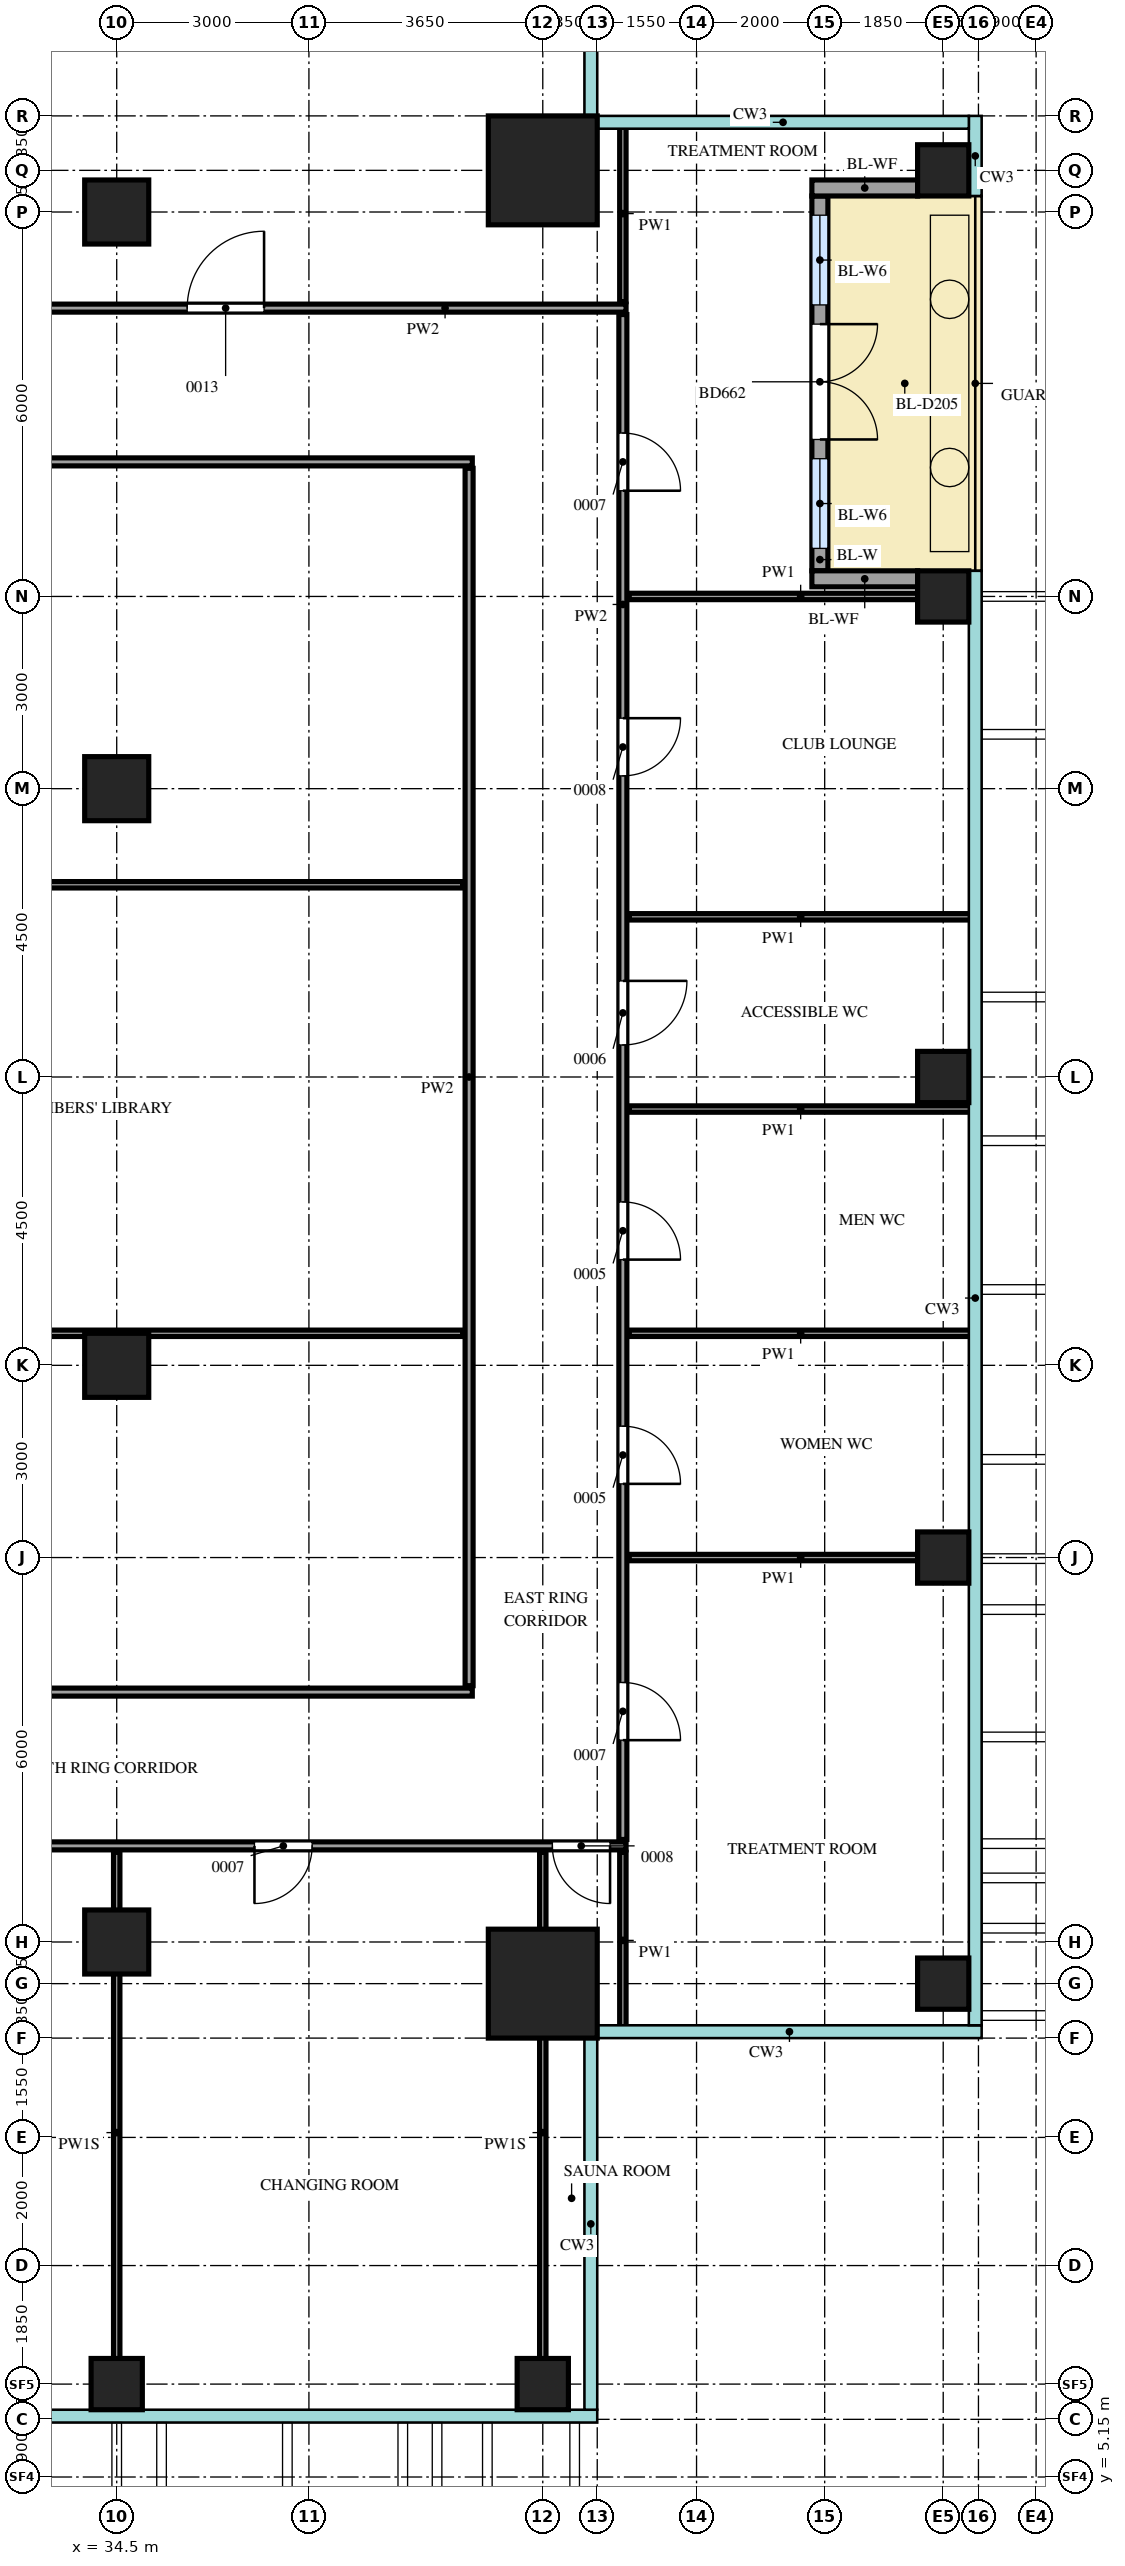
"""IFC4 building model, lengths in metres.
Left out: names, types, materials, properties, quantities, classifications, styles, units other than length and angle.
Written with IfcOpenShell. Run it as: python <this file> out.ifc"""

import sys

from ifc_helpers import new_model, si_unit, direction, frame, frame_2d, origin, origin_2d, place, context, subcontext, project, spatial, rectangle, extrude, source, transform, mapped, element, fill, save


model = new_model("IFC4")
c1 = context("Model", 3, precision=1e-05, world=origin(), true_north=direction((0.0, 1.0)))
c2 = subcontext(c1, "Body", "Model", "MODEL_VIEW")
j1 = project(units=[si_unit("LENGTHUNIT", "METRE"), si_unit("PLANEANGLEUNIT", "RADIAN")], contexts=[c1])
p1 = place(None, origin())
s1 = spatial("IfcSite", under=j1, at=p1, CompositionType="ELEMENT")
p2 = place(p1, origin())
s2 = spatial("IfcBuilding", under=s1, at=p2, CompositionType="ELEMENT")
p3 = place(p2, frame((0.0, 0.0, 294.2)))
s3 = spatial("IfcBuildingStorey", under=s2, at=p3, CompositionType="ELEMENT", Elevation=294.2)
m1 = source(origin(), c2, "Body", "SweptSolid", [
    extrude(rectangle(XDim=1.7, YDim=1.7, at=origin_2d()), origin(), (0.0, 0.0, 1.0), 3.75),
])
for number, where, z_axis, x_axis in (
    (1, (41.15, 41.15, 0.0), (0.0, 0.0, 1.0), (1.0, 0.0, 0.0)),
    (2, (41.15, 12.85, 0.0), (0.0, 0.0, 1.0), (1.0, 0.0, 0.0)),
):
    element("IfcColumn", number, at=place(p3, frame(where, z_axis=z_axis, x_axis=x_axis)), inside=s3, PredefinedType="COLUMN", context=c2, shape_type="MappedRepresentation", body=[
        mapped(m1, transform((0.0, 0.0, 0.0))),
    ])
m2 = source(origin(), c2, "Body", "SweptSolid", [
    extrude(rectangle(XDim=0.8, YDim=0.8, at=origin_2d()), origin(), (0.0, 0.0, 1.0), 3.75),
])
for number, where, z_axis, x_axis in (
    (3, (34.5, 6.6, 0.0), (0.0, 0.0, 1.0), (1.0, 0.0, 0.0)),
    (4, (41.15, 6.6, 0.0), (0.0, 0.0, 1.0), (1.0, 0.0, 0.0)),
    (5, (47.4, 12.85, 0.0), (0.0, 0.0, 1.0), (1.0, 0.0, 0.0)),
    (6, (47.4, 19.5, 0.0), (0.0, 0.0, 1.0), (1.0, 0.0, 0.0)),
    (7, (47.4, 27.0, 0.0), (0.0, 0.0, 1.0), (1.0, 0.0, 0.0)),
    (8, (47.4, 34.5, 0.0), (0.0, 0.0, 1.0), (1.0, 0.0, 0.0)),
    (9, (47.4, 41.15, 0.0), (0.0, 0.0, 1.0), (1.0, 0.0, 0.0)),
):
    element("IfcColumn", number, at=place(p3, frame(where, z_axis=z_axis, x_axis=x_axis)), inside=s3, PredefinedType="COLUMN", context=c2, shape_type="MappedRepresentation", body=[
        mapped(m2, transform((0.0, 0.0, 0.0))),
    ])
m3 = source(origin(), c2, "Body", "SweptSolid", [
    extrude(rectangle(XDim=1.0, YDim=1.0, at=origin_2d()), origin(), (0.0, 0.0, 1.0), 3.75),
])
for number, where, z_axis, x_axis in (
    (10, (34.5, 13.5, 0.0), (0.0, 0.0, 1.0), (1.0, 0.0, 0.0)),
    (11, (34.5, 22.5, 0.0), (0.0, 0.0, 1.0), (1.0, 0.0, 0.0)),
    (12, (34.5, 31.5, 0.0), (0.0, 0.0, 1.0), (1.0, 0.0, 0.0)),
    (13, (34.5, 40.5, 0.0), (0.0, 0.0, 1.0), (1.0, 0.0, 0.0)),
):
    element("IfcColumn", number, at=place(p3, frame(where, z_axis=z_axis, x_axis=x_axis)), inside=s3, PredefinedType="COLUMN", context=c2, shape_type="MappedRepresentation", body=[
        mapped(m3, transform((0.0, 0.0, 0.0))),
    ])
m4 = source(origin(), c2, "Body", "SweptSolid", [
    extrude(rectangle(XDim=5.85, YDim=0.25, at=frame_2d((2.925, 0.0))), origin(), (0.0, 0.0, 1.0), 3.75),
])
p4 = place(p3, frame((45.475, 34.9, 0.0), z_axis=(0.0, 0.0, 1.0), x_axis=(0.0, 1.0, 0.0)))
e14 = element("IfcWall", 14, at=p4, inside=s3, PredefinedType="SOLIDWALL", context=c2, shape_type="MappedRepresentation", body=[
    mapped(m4, transform((0.0, 0.0, 0.0))),
])
m5 = source(origin(), c2, "Body", "SweptSolid", [
    extrude(rectangle(XDim=1.4, YDim=2.4, at=frame_2d((0.7, 1.2))), frame((0.0, 0.135, 0.0), z_axis=(0.0, -1.0, 0.0), x_axis=(1.0, 0.0, 0.0)), (0.0, 0.0, 1.0), 0.27),
])
p5 = place(p4, frame((0.35, 0.0, 0.0)))
e15 = element("IfcOpeningElement", 15, at=p5, cuts=e14, PredefinedType="OPENING", context=c2, shape_type="MappedRepresentation", body=[
    mapped(m5, transform((0.0, 0.0, 0.0))),
])
p6 = place(p4, frame((4.15, 0.0, 0.0)))
e16 = element("IfcOpeningElement", 16, at=p6, cuts=e14, PredefinedType="OPENING", context=c2, shape_type="MappedRepresentation", body=[
    mapped(m5, transform((0.0, 0.0, 0.0))),
])
m6 = source(origin(), c2, "Body", "SweptSolid", [
    extrude(rectangle(XDim=1.8, YDim=2.4, at=frame_2d((0.9, 1.2))), frame((0.0, 0.135, 0.0), z_axis=(0.0, -1.0, 0.0), x_axis=(1.0, 0.0, 0.0)), (0.0, 0.0, 1.0), 0.27),
])
p7 = place(p4, frame((2.05, 0.0, 0.0)))
e17 = element("IfcOpeningElement", 17, at=p7, cuts=e14, PredefinedType="OPENING", context=c2, shape_type="MappedRepresentation", body=[
    mapped(m6, transform((0.0, 0.0, 0.0))),
])
m7 = source(origin(), c2, "Body", "SweptSolid", [
    extrude(rectangle(XDim=1.65, YDim=0.25, at=frame_2d((0.825, 0.0))), origin(), (0.0, 0.0, 1.0), 3.45),
])
for number, where, z_axis, x_axis in (
    (18, (47.0, 34.775, 0.0), (0.0, 0.0, 1.0), (-1.0, 0.0, 0.0)),
    (19, (47.0, 40.875, 0.0), (0.0, 0.0, 1.0), (-1.0, 0.0, 0.0)),
):
    element("IfcWall", number, at=place(p3, frame(where, z_axis=z_axis, x_axis=x_axis)), inside=s3, PredefinedType="SOLIDWALL", context=c2, shape_type="MappedRepresentation", body=[
        mapped(m7, transform((0.0, 0.0, 0.0))),
    ])
m8 = source(origin(), c2, "Body", "SweptSolid", [
    extrude(rectangle(XDim=8.75, YDim=0.1, at=frame_2d((4.375, 0.0))), origin(), (0.0, 0.0, 1.0), 3.35),
])
for number, where, z_axis, x_axis in (
    (20, (34.5, 6.15, 0.0), (0.0, 0.0, 1.0), (0.0, 1.0, 0.0)),
    (21, (41.15, 6.15, 0.0), (0.0, 0.0, 1.0), (0.0, 1.0, 0.0)),
):
    element("IfcWall", number, at=place(p3, frame(where, z_axis=z_axis, x_axis=x_axis)), inside=s3, PredefinedType="PARTITIONING", context=c2, shape_type="MappedRepresentation", body=[
        mapped(m8, transform((0.0, 0.0, 0.0))),
    ])
m9 = source(origin(), c2, "Body", "SweptSolid", [
    extrude(rectangle(XDim=2.75, YDim=0.1, at=frame_2d((1.375, 0.0))), origin(), (0.0, 0.0, 1.0), 3.8),
])
p8 = place(p3, frame((42.4, 12.15, 0.0), z_axis=(0.0, 0.0, 1.0), x_axis=(0.0, 1.0, 0.0)))
e22 = element("IfcWall", 22, at=p8, inside=s3, PredefinedType="PARTITIONING", context=c2, shape_type="MappedRepresentation", body=[
    mapped(m9, transform((0.0, 0.0, 0.0))),
])
m10 = source(origin(), c2, "Body", "SweptSolid", [
    extrude(rectangle(XDim=19.1, YDim=0.125, at=frame_2d((9.55, 0.0))), origin(), (0.0, 0.0, 1.0), 3.8),
])
p9 = place(p3, frame((23.35, 15.0, 0.0), z_axis=(0.0, 0.0, 1.0), x_axis=(1.0, 0.0, 0.0)))
e23 = element("IfcWall", 23, at=p9, inside=s3, PredefinedType="PARTITIONING", context=c2, shape_type="MappedRepresentation", body=[
    mapped(m10, transform((0.0, 0.0, 0.0))),
])
m11 = source(origin(), c2, "Body", "SweptSolid", [
    extrude(rectangle(XDim=0.9, YDim=2.1, at=frame_2d((0.45, 1.05))), frame((0.0, 0.073, 0.0), z_axis=(0.0, -1.0, 0.0), x_axis=(1.0, 0.0, 0.0)), (0.0, 0.0, 1.0), 0.145),
])
p10 = place(p9, frame((5.3, 0.0, 0.0)))
e24 = element("IfcOpeningElement", 24, at=p10, cuts=e23, PredefinedType="OPENING", context=c2, shape_type="MappedRepresentation", body=[
    mapped(m11, transform((0.0, 0.0, 0.0))),
])
p11 = place(p9, frame((13.3, 0.0, 0.0)))
e25 = element("IfcOpeningElement", 25, at=p11, cuts=e23, PredefinedType="OPENING", context=c2, shape_type="MappedRepresentation", body=[
    mapped(m11, transform((0.0, 0.0, 0.0))),
])
p12 = place(p9, frame((17.95, 0.0, 0.0)))
e26 = element("IfcOpeningElement", 26, at=p12, cuts=e23, PredefinedType="OPENING", context=c2, shape_type="MappedRepresentation", body=[
    mapped(m11, transform((0.0, 0.0, 0.0))),
])
m12 = source(origin(), c2, "Body", "SweptSolid", [
    extrude(rectangle(XDim=23.8, YDim=0.125, at=frame_2d((11.9, 0.0))), origin(), (0.0, 0.0, 1.0), 3.8),
])
p13 = place(p3, frame((42.4, 15.1, 0.0), z_axis=(0.0, 0.0, 1.0), x_axis=(0.0, 1.0, 0.0)))
e27 = element("IfcWall", 27, at=p13, inside=s3, PredefinedType="PARTITIONING", context=c2, shape_type="MappedRepresentation", body=[
    mapped(m12, transform((0.0, 0.0, 0.0))),
])
p14 = place(p13, frame((1.55, 0.0, 0.0)))
e28 = element("IfcOpeningElement", 28, at=p14, cuts=e27, PredefinedType="OPENING", context=c2, shape_type="MappedRepresentation", body=[
    mapped(m11, transform((0.0, 0.0, 0.0))),
])
p15 = place(p13, frame((5.55, 0.0, 0.0)))
e29 = element("IfcOpeningElement", 29, at=p15, cuts=e27, PredefinedType="OPENING", context=c2, shape_type="MappedRepresentation", body=[
    mapped(m11, transform((0.0, 0.0, 0.0))),
])
p16 = place(p13, frame((9.05, 0.0, 0.0)))
e30 = element("IfcOpeningElement", 30, at=p16, cuts=e27, PredefinedType="OPENING", context=c2, shape_type="MappedRepresentation", body=[
    mapped(m11, transform((0.0, 0.0, 0.0))),
])
m13 = source(origin(), c2, "Body", "SweptSolid", [
    extrude(rectangle(XDim=1.0, YDim=2.1, at=frame_2d((0.5, 1.05))), frame((0.0, 0.073, 0.0), z_axis=(0.0, -1.0, 0.0), x_axis=(1.0, 0.0, 0.0)), (0.0, 0.0, 1.0), 0.145),
])
p17 = place(p13, frame((12.4, 0.0, 0.0)))
e31 = element("IfcOpeningElement", 31, at=p17, cuts=e27, PredefinedType="OPENING", context=c2, shape_type="MappedRepresentation", body=[
    mapped(m13, transform((0.0, 0.0, 0.0))),
])
p18 = place(p13, frame((16.6, 0.0, 0.0)))
e32 = element("IfcOpeningElement", 32, at=p18, cuts=e27, PredefinedType="OPENING", context=c2, shape_type="MappedRepresentation", body=[
    mapped(m11, transform((0.0, 0.0, 0.0))),
])
p19 = place(p13, frame((21.05, 0.0, 0.0)))
e33 = element("IfcOpeningElement", 33, at=p19, cuts=e27, PredefinedType="OPENING", context=c2, shape_type="MappedRepresentation", body=[
    mapped(m11, transform((0.0, 0.0, 0.0))),
])
m14 = source(origin(), c2, "Body", "SweptSolid", [
    extrude(rectangle(XDim=16.7, YDim=0.125, at=frame_2d((8.35, 0.0))), origin(), (0.0, 0.0, 1.0), 3.8),
])
p20 = place(p3, frame((23.35, 17.4, 0.0), z_axis=(0.0, 0.0, 1.0), x_axis=(1.0, 0.0, 0.0)))
e34 = element("IfcWall", 34, at=p20, inside=s3, PredefinedType="PARTITIONING", context=c2, shape_type="MappedRepresentation", body=[
    mapped(m14, transform((0.0, 0.0, 0.0))),
])
p21 = place(p20, frame((8.05, 0.0, 0.0)))
e35 = element("IfcOpeningElement", 35, at=p21, cuts=e34, PredefinedType="OPENING", context=c2, shape_type="MappedRepresentation", body=[
    mapped(m11, transform((0.0, 0.0, 0.0))),
])
m15 = source(origin(), c2, "Body", "SweptSolid", [
    extrude(rectangle(XDim=19.0, YDim=0.125, at=frame_2d((9.5, 0.0))), origin(), (0.0, 0.0, 1.0), 3.8),
])
p22 = place(p3, frame((40.0, 17.5, 0.0), z_axis=(0.0, 0.0, 1.0), x_axis=(0.0, 1.0, 0.0)))
e36 = element("IfcWall", 36, at=p22, inside=s3, PredefinedType="PARTITIONING", context=c2, shape_type="MappedRepresentation", body=[
    mapped(m15, transform((0.0, 0.0, 0.0))),
])
m16 = source(origin(), c2, "Body", "SweptSolid", [
    extrude(rectangle(XDim=5.35, YDim=0.1, at=frame_2d((2.675, 0.0))), origin(), (0.0, 0.0, 1.0), 3.8),
])
p23 = place(p3, frame((42.5, 19.5, 0.0), z_axis=(0.0, 0.0, 1.0), x_axis=(1.0, 0.0, 0.0)))
e37 = element("IfcWall", 37, at=p23, inside=s3, PredefinedType="PARTITIONING", context=c2, shape_type="MappedRepresentation", body=[
    mapped(m16, transform((0.0, 0.0, 0.0))),
])
m17 = source(origin(), c2, "Body", "SweptSolid", [
    extrude(rectangle(XDim=16.4, YDim=0.1, at=frame_2d((8.2, 0.0))), origin(), (0.0, 0.0, 1.0), 3.8),
])
p24 = place(p3, frame((23.5, 23.0, 0.0), z_axis=(0.0, 0.0, 1.0), x_axis=(1.0, 0.0, 0.0)))
e38 = element("IfcWall", 38, at=p24, inside=s3, PredefinedType="PARTITIONING", context=c2, shape_type="MappedRepresentation", body=[
    mapped(m17, transform((0.0, 0.0, 0.0))),
])
for number, where, z_axis, x_axis in (
    (39, (42.5, 23.0, 0.0), (0.0, 0.0, 1.0), (1.0, 0.0, 0.0)),
    (40, (42.5, 26.5, 0.0), (0.0, 0.0, 1.0), (1.0, 0.0, 0.0)),
    (41, (42.5, 29.5, 0.0), (0.0, 0.0, 1.0), (1.0, 0.0, 0.0)),
):
    element("IfcWall", number, at=place(p3, frame(where, z_axis=z_axis, x_axis=x_axis)), inside=s3, PredefinedType="PARTITIONING", context=c2, shape_type="MappedRepresentation", body=[
        mapped(m16, transform((0.0, 0.0, 0.0))),
    ])
p25 = place(p3, frame((23.5, 30.0, 0.0), z_axis=(0.0, 0.0, 1.0), x_axis=(1.0, 0.0, 0.0)))
e42 = element("IfcWall", 42, at=p25, inside=s3, PredefinedType="PARTITIONING", context=c2, shape_type="MappedRepresentation", body=[
    mapped(m17, transform((0.0, 0.0, 0.0))),
])
p26 = place(p3, frame((42.5, 34.5, 0.0), z_axis=(0.0, 0.0, 1.0), x_axis=(1.0, 0.0, 0.0)))
e43 = element("IfcWall", 43, at=p26, inside=s3, PredefinedType="PARTITIONING", context=c2, shape_type="MappedRepresentation", body=[
    mapped(m16, transform((0.0, 0.0, 0.0))),
])
p27 = place(p3, frame((23.35, 36.6, 0.0), z_axis=(0.0, 0.0, 1.0), x_axis=(1.0, 0.0, 0.0)))
e44 = element("IfcWall", 44, at=p27, inside=s3, PredefinedType="PARTITIONING", context=c2, shape_type="MappedRepresentation", body=[
    mapped(m14, transform((0.0, 0.0, 0.0))),
])
p28 = place(p27, frame((8.05, 0.0, 0.0)))
e45 = element("IfcOpeningElement", 45, at=p28, cuts=e44, PredefinedType="OPENING", context=c2, shape_type="MappedRepresentation", body=[
    mapped(m11, transform((0.0, 0.0, 0.0))),
])
m18 = source(origin(), c2, "Body", "SweptSolid", [
    extrude(rectangle(XDim=12.1, YDim=0.125, at=frame_2d((6.05, 0.0))), origin(), (0.0, 0.0, 1.0), 3.8),
])
p29 = place(p3, frame((30.35, 39.0, 0.0), z_axis=(0.0, 0.0, 1.0), x_axis=(1.0, 0.0, 0.0)))
e46 = element("IfcWall", 46, at=p29, inside=s3, PredefinedType="PARTITIONING", context=c2, shape_type="MappedRepresentation", body=[
    mapped(m18, transform((0.0, 0.0, 0.0))),
])
m19 = source(origin(), c2, "Body", "SweptSolid", [
    extrude(rectangle(XDim=1.2, YDim=2.1, at=frame_2d((0.6, 1.05))), frame((0.0, 0.073, 0.0), z_axis=(0.0, -1.0, 0.0), x_axis=(1.0, 0.0, 0.0)), (0.0, 0.0, 1.0), 0.145),
])
p30 = place(p29, frame((5.25, 0.0, 0.0)))
e47 = element("IfcOpeningElement", 47, at=p30, cuts=e46, PredefinedType="OPENING", context=c2, shape_type="MappedRepresentation", body=[
    mapped(m19, transform((0.0, 0.0, 0.0))),
])
p31 = place(p3, frame((42.4, 39.1, 0.0), z_axis=(0.0, 0.0, 1.0), x_axis=(0.0, 1.0, 0.0)))
e48 = element("IfcWall", 48, at=p31, inside=s3, PredefinedType="PARTITIONING", context=c2, shape_type="MappedRepresentation", body=[
    mapped(m9, transform((0.0, 0.0, 0.0))),
])
m20 = source(origin(), c2, "Body", "SweptSolid", [
    extrude(rectangle(XDim=1.4, YDim=2.4, at=frame_2d((0.7, 1.2))), frame((0.0, 0.03, 0.0), z_axis=(0.0, -1.0, 0.0), x_axis=(1.0, 0.0, 0.0)), (0.0, 0.0, 1.0), 0.06),
])
p32 = place(p5, origin())
e49 = element("IfcWindow", 49, at=p32, inside=s3, PartitioningType="SINGLE_PANEL", PredefinedType="WINDOW", context=c2, shape_type="MappedRepresentation", body=[
    mapped(m20, transform((0.0, 0.0, 0.0))),
])
fill(e15, e49)
p33 = place(p6, origin())
e50 = element("IfcWindow", 50, at=p33, inside=s3, PartitioningType="SINGLE_PANEL", PredefinedType="WINDOW", context=c2, shape_type="MappedRepresentation", body=[
    mapped(m20, transform((0.0, 0.0, 0.0))),
])
fill(e16, e50)
m21 = source(origin(), c2, "Body", "SweptSolid", [
    extrude(rectangle(XDim=1.8, YDim=2.4, at=frame_2d((0.9, 1.2))), frame((0.0, 0.025, 0.0), z_axis=(0.0, -1.0, 0.0), x_axis=(1.0, 0.0, 0.0)), (0.0, 0.0, 1.0), 0.05),
])
p34 = place(p7, origin())
e51 = element("IfcDoor", 51, at=p34, inside=s3, OperationType="DOUBLE_DOOR_DOUBLE_SWING", PredefinedType="DOOR", context=c2, shape_type="MappedRepresentation", body=[
    mapped(m21, transform((0.0, 0.0, 0.0))),
])
fill(e17, e51)
m22 = source(origin(), c2, "Body", "SweptSolid", [
    extrude(rectangle(XDim=0.9, YDim=2.1, at=frame_2d((0.45, 1.05))), frame((0.0, 0.025, 0.0), z_axis=(0.0, -1.0, 0.0), x_axis=(1.0, 0.0, 0.0)), (0.0, 0.0, 1.0), 0.05),
])
p35 = place(p11, origin())
e52 = element("IfcDoor", 52, at=p35, inside=s3, OperationType="SINGLE_SWING_LEFT", PredefinedType="DOOR", context=c2, shape_type="MappedRepresentation", body=[
    mapped(m22, transform((0.0, 0.0, 0.0))),
])
fill(e25, e52)
p36 = place(p12, origin())
e53 = element("IfcDoor", 53, at=p36, inside=s3, OperationType="SINGLE_SWING_RIGHT", PredefinedType="DOOR", context=c2, shape_type="MappedRepresentation", body=[
    mapped(m22, transform((0.0, 0.0, 0.0))),
])
fill(e26, e53)
p37 = place(p14, origin())
e54 = element("IfcDoor", 54, at=p37, inside=s3, OperationType="SINGLE_SWING_LEFT", PredefinedType="DOOR", context=c2, shape_type="MappedRepresentation", body=[
    mapped(m22, transform((0.0, 0.0, 0.0))),
])
fill(e28, e54)
p38 = place(p15, origin())
e55 = element("IfcDoor", 55, at=p38, inside=s3, OperationType="SINGLE_SWING_LEFT", PredefinedType="DOOR", context=c2, shape_type="MappedRepresentation", body=[
    mapped(m22, transform((0.0, 0.0, 0.0))),
])
fill(e29, e55)
p39 = place(p16, origin())
e56 = element("IfcDoor", 56, at=p39, inside=s3, OperationType="SINGLE_SWING_LEFT", PredefinedType="DOOR", context=c2, shape_type="MappedRepresentation", body=[
    mapped(m22, transform((0.0, 0.0, 0.0))),
])
fill(e30, e56)
m23 = source(origin(), c2, "Body", "SweptSolid", [
    extrude(rectangle(XDim=1.0, YDim=2.1, at=frame_2d((0.5, 1.05))), frame((0.0, 0.025, 0.0), z_axis=(0.0, -1.0, 0.0), x_axis=(1.0, 0.0, 0.0)), (0.0, 0.0, 1.0), 0.05),
])
p40 = place(p17, origin())
e57 = element("IfcDoor", 57, at=p40, inside=s3, OperationType="SINGLE_SWING_RIGHT", PredefinedType="DOOR", context=c2, shape_type="MappedRepresentation", body=[
    mapped(m23, transform((0.0, 0.0, 0.0))),
])
fill(e31, e57)
p41 = place(p18, origin())
e58 = element("IfcDoor", 58, at=p41, inside=s3, OperationType="SINGLE_SWING_RIGHT", PredefinedType="DOOR", context=c2, shape_type="MappedRepresentation", body=[
    mapped(m22, transform((0.0, 0.0, 0.0))),
])
fill(e32, e58)
p42 = place(p19, origin())
e59 = element("IfcDoor", 59, at=p42, inside=s3, OperationType="SINGLE_SWING_LEFT", PredefinedType="DOOR", context=c2, shape_type="MappedRepresentation", body=[
    mapped(m22, transform((0.0, 0.0, 0.0))),
])
fill(e33, e59)
m24 = source(origin(), c2, "Body", "SweptSolid", [
    extrude(rectangle(XDim=1.2, YDim=2.1, at=frame_2d((0.6, 1.05))), frame((0.0, 0.025, 0.0), z_axis=(0.0, -1.0, 0.0), x_axis=(1.0, 0.0, 0.0)), (0.0, 0.0, 1.0), 0.05),
])
p43 = place(p30, origin())
e60 = element("IfcDoor", 60, at=p43, inside=s3, OperationType="SINGLE_SWING_LEFT", PredefinedType="DOOR", context=c2, shape_type="MappedRepresentation", body=[
    mapped(m24, transform((0.0, 0.0, 0.0))),
])
fill(e47, e60)
save(model, sys.argv[1])
